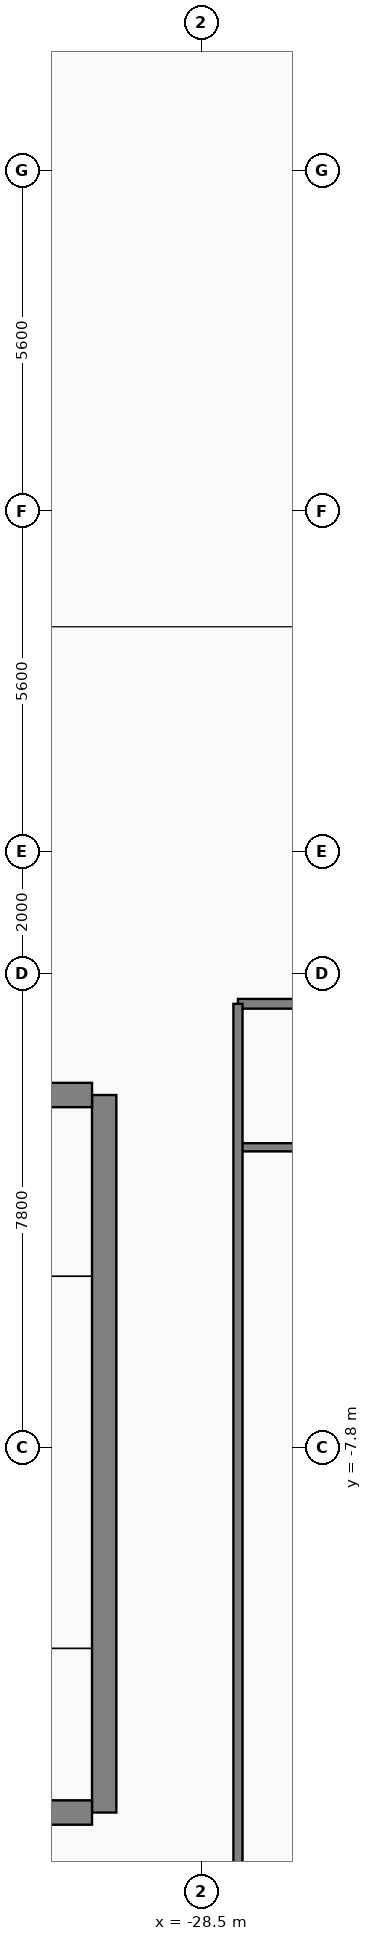
"""IFC4 building model, lengths in metres.
Left out: names, types, materials, properties, quantities, classifications, styles, units other than length and angle.
Written with IfcOpenShell. Run it as: python <this file> out.ifc"""

import sys

from ifc_helpers import new_model, si_unit, direction, frame, frame_2d, origin, place, context, subcontext, project, spatial, rectangle, extrude, element, fill, save


model = new_model("IFC4")
c1 = context("Model", 3, precision=1e-05, world=origin(), true_north=direction((0.0, 1.0)))
c2 = subcontext(c1, "Body", "Model", "MODEL_VIEW")
j1 = project(units=[si_unit("LENGTHUNIT", "METRE"), si_unit("PLANEANGLEUNIT", "RADIAN")], contexts=[c1])
p1 = place(None, origin())
s1 = spatial("IfcSite", under=j1, at=p1, CompositionType="ELEMENT")
p2 = place(p1, origin())
s2 = spatial("IfcBuilding", under=s1, at=p2, CompositionType="ELEMENT")
p3 = place(p2, frame((0.0, 0.0, 11.4)))
s3 = spatial("IfcBuildingStorey", under=s2, at=p3, CompositionType="ELEMENT", Elevation=11.4)
p4 = place(p3, frame((-30.1, -13.8, 0.0), z_axis=(0.0, 0.0, 1.0), x_axis=(0.0, 1.0, 0.0)))
e1 = element("IfcWall", 1, at=p4, inside=s3, PredefinedType="SHEAR", context=c2, shape_type="SweptSolid", body=[
    extrude(rectangle(XDim=11.8, YDim=0.4, at=frame_2d((5.9, 0.0))), origin(), (0.0, 0.0, 1.0), 6.41),
])
p5 = place(p4, frame((0.45, 0.0, 0.0)))
e2 = element("IfcOpeningElement", 2, at=p5, cuts=e1, PredefinedType="OPENING", context=c2, shape_type="SweptSolid", body=[
    extrude(rectangle(XDim=1.12, YDim=2.22, at=frame_2d((0.56, 1.11))), frame((0.0, 0.21, 0.0), z_axis=(0.0, -1.0, 0.0), x_axis=(1.0, 0.0, 0.0)), (0.0, 0.0, 1.0), 0.42),
])
for number, where, z_axis, x_axis in (
    (3, (-35.65, -13.8, 0.0), (0.0, 0.0, 1.0), (1.0, 0.0, 0.0)),
    (4, (-35.65, -2.0, 0.0), (0.0, 0.0, 1.0), (1.0, 0.0, 0.0)),
):
    element("IfcWall", number, at=place(p3, frame(where, z_axis=z_axis, x_axis=x_axis)), inside=s3, PredefinedType="SHEAR", context=c2, shape_type="SweptSolid", body=[
        extrude(rectangle(XDim=5.35, YDim=0.4, at=frame_2d((2.675, 0.0))), origin(), (0.0, 0.0, 1.0), 6.41),
    ])
p6 = place(p3, frame((-27.9, -0.5, 0.0), z_axis=(0.0, 0.0, 1.0), x_axis=(1.0, 0.0, 0.0)))
e5 = element("IfcWall", 5, at=p6, inside=s3, PredefinedType="PARTITIONING", context=c2, shape_type="SweptSolid", body=[
    extrude(rectangle(XDim=9.3, YDim=0.16, at=frame_2d((4.65, 0.0))), origin(), (0.0, 0.0, 1.0), 6.34),
])
p7 = place(p6, frame((5.3, 0.0, 0.0)))
e6 = element("IfcOpeningElement", 6, at=p7, cuts=e5, PredefinedType="OPENING", context=c2, shape_type="SweptSolid", body=[
    extrude(rectangle(XDim=1.0, YDim=2.15, at=frame_2d((0.5, 1.075))), frame((0.0, 0.09, 0.0), z_axis=(0.0, -1.0, 0.0), x_axis=(1.0, 0.0, 0.0)), (0.0, 0.0, 1.0), 0.18),
])
p8 = place(p3, frame((-27.9, -2.86, 0.0), z_axis=(0.0, 0.0, 1.0), x_axis=(1.0, 0.0, 0.0)))
e7 = element("IfcWall", 7, at=p8, inside=s3, PredefinedType="PLUMBINGWALL", context=c2, shape_type="SweptSolid", body=[
    extrude(rectangle(XDim=2.26, YDim=0.135, at=frame_2d((1.13, 0.0))), origin(), (0.0, 0.0, 1.0), 6.34),
])
p9 = place(p3, frame((-27.9, -23.85, 0.0), z_axis=(0.0, 0.0, 1.0), x_axis=(0.0, 1.0, 0.0)))
e8 = element("IfcWall", 8, at=p9, inside=s3, PredefinedType="PARTITIONING", context=c2, shape_type="SweptSolid", body=[
    extrude(rectangle(XDim=23.35, YDim=0.15, at=frame_2d((11.675, 0.0))), origin(), (0.0, 0.0, 1.0), 6.34),
])
p10 = place(p5, origin())
e9 = element("IfcDoor", 9, at=p10, inside=s3, OperationType="SINGLE_SWING_RIGHT", PredefinedType="DOOR", context=c2, shape_type="SweptSolid", body=[
    extrude(rectangle(XDim=1.12, YDim=2.22, at=frame_2d((0.56, 1.11))), frame((0.0, 0.025, 0.0), z_axis=(0.0, -1.0, 0.0), x_axis=(1.0, 0.0, 0.0)), (0.0, 0.0, 1.0), 0.05),
])
fill(e2, e9)
save(model, sys.argv[1])
